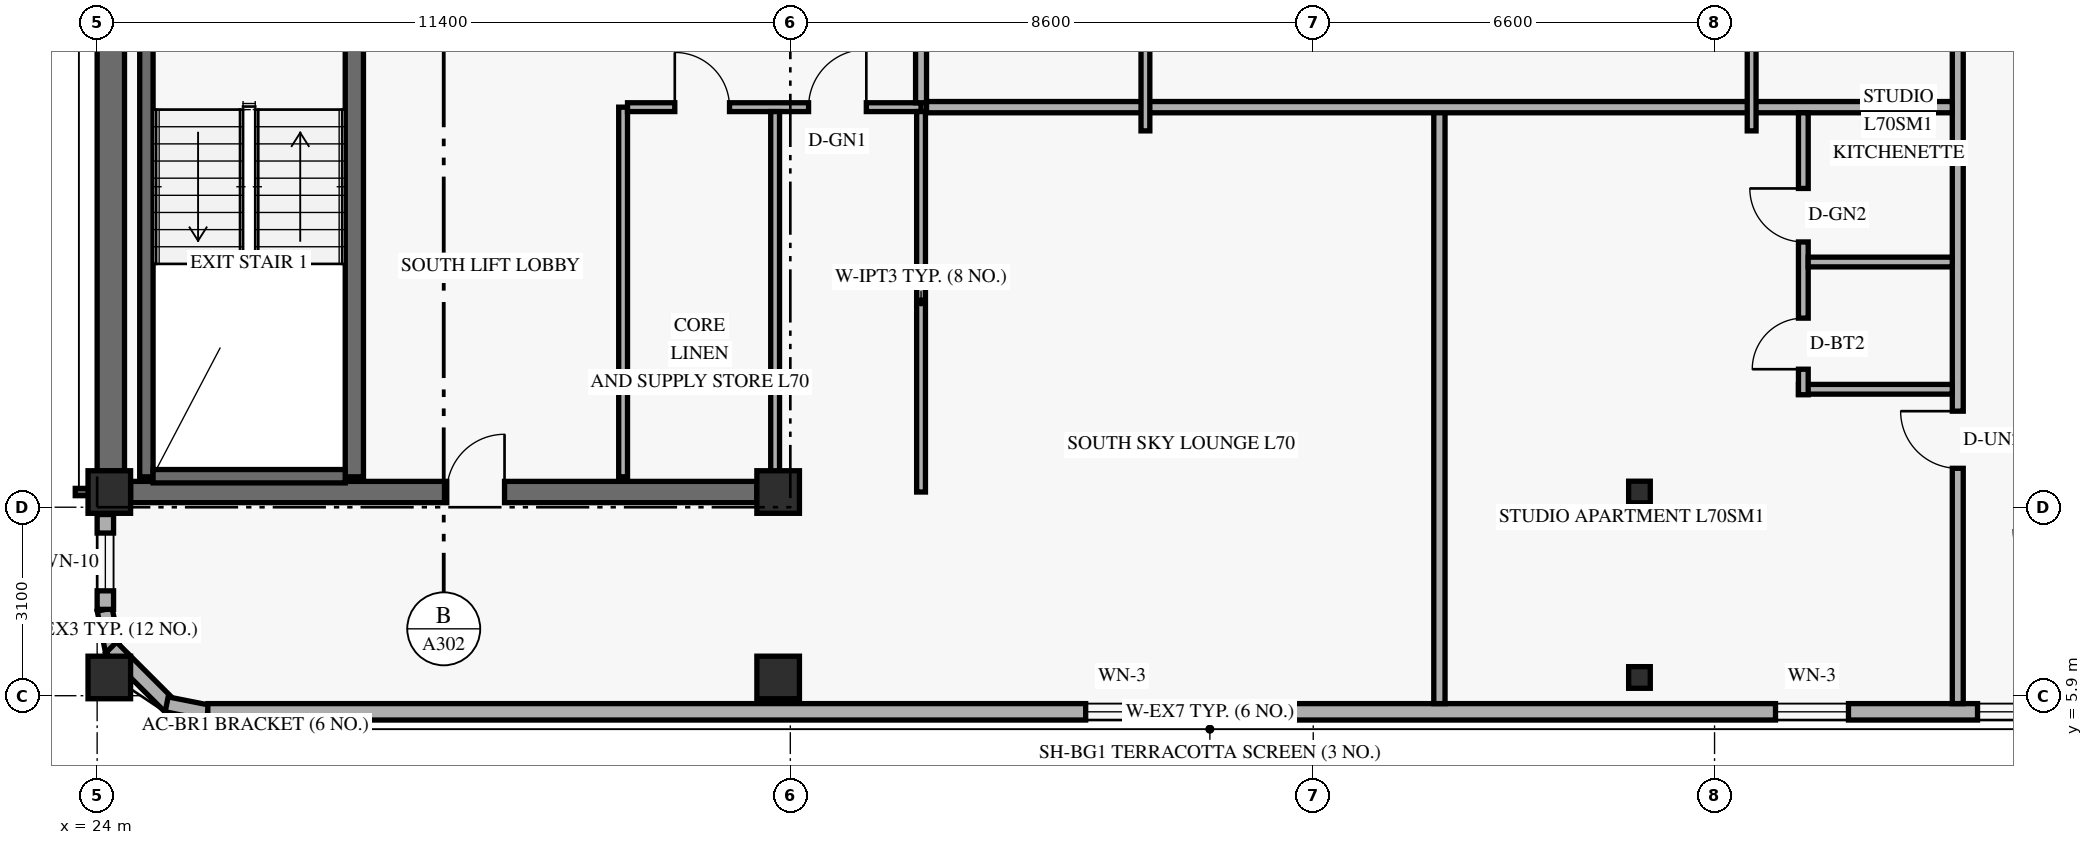
"""IFC4 building model, lengths in metres.
Left out: names, types, materials, properties, quantities, classifications, styles, units other than length and angle.
Written with IfcOpenShell. Run it as: python <this file> out.ifc"""

import sys

from ifc_helpers import new_model, si_unit, direction, frame, frame_2d, origin, origin_2d, place, context, subcontext, project, spatial, rectangle, hollow_rectangle, extrude, element, fill, save


model = new_model("IFC4")
c1 = context("Model", 3, precision=1e-05, world=origin(), true_north=direction((0.0, 1.0)))
c2 = subcontext(c1, "Body", "Model", "MODEL_VIEW")
j1 = project(units=[si_unit("LENGTHUNIT", "METRE"), si_unit("PLANEANGLEUNIT", "RADIAN")], contexts=[c1])
p1 = place(None, origin())
s1 = spatial("IfcSite", under=j1, at=p1, CompositionType="ELEMENT")
p2 = place(p1, origin())
s2 = spatial("IfcBuilding", under=s1, at=p2, CompositionType="ELEMENT")
p3 = place(p2, frame((0.0, 0.0, 267.6)))
s3 = spatial("IfcBuildingStorey", under=s2, at=p3, CompositionType="ELEMENT", Elevation=267.6)
p4 = place(p3, frame((24.225, 9.6, 0.0), z_axis=(0.0, 0.0, 1.0), x_axis=(0.0, 1.0, 0.0)))
e1 = element("IfcWall", 1, at=p4, inside=s3, PredefinedType="SHEAR", context=c2, shape_type="SweptSolid", body=[
    extrude(rectangle(XDim=7.6, YDim=0.45, at=frame_2d((3.8, 0.0))), origin(), (0.0, 0.0, 1.0), 2.821),
])
p5 = place(p3, frame((24.55, 9.25, 0.0), z_axis=(0.0, 0.0, 1.0), x_axis=(1.0, 0.0, 0.0)))
e2 = element("IfcWall", 2, at=p5, inside=s3, PredefinedType="SHEAR", context=c2, shape_type="SweptSolid", body=[
    extrude(rectangle(XDim=10.3, YDim=0.35, at=frame_2d((5.15, 0.0))), origin(), (0.0, 0.0, 1.0), 3.36),
])
p6 = place(p5, frame((5.2, 0.0, 0.0)))
e3 = element("IfcOpeningElement", 3, at=p6, cuts=e2, PredefinedType="OPENING", context=c2, shape_type="SweptSolid", body=[
    extrude(rectangle(XDim=0.95, YDim=2.15, at=frame_2d((0.475, 1.075))), frame((0.0, 0.185, 0.0), z_axis=(0.0, -1.0, 0.0), x_axis=(1.0, 0.0, 0.0)), (0.0, 0.0, 1.0), 0.37),
])
p7 = place(p3, frame((24.81, 9.5, 0.0), z_axis=(0.0, 0.0, 1.0), x_axis=(0.0, 1.0, 0.0)))
e4 = element("IfcWall", 4, at=p7, inside=s3, PredefinedType="SHEAR", context=c2, shape_type="SweptSolid", body=[
    extrude(rectangle(XDim=7.76, YDim=0.22, at=frame_2d((3.88, 0.0))), origin(), (0.0, 0.0, 1.0), 3.36),
])
p8 = place(p3, frame((28.23, 9.5, 0.0), z_axis=(0.0, 0.0, 1.0), x_axis=(0.0, 1.0, 0.0)))
e5 = element("IfcWall", 5, at=p8, inside=s3, PredefinedType="SHEAR", context=c2, shape_type="SweptSolid", body=[
    extrude(rectangle(XDim=7.76, YDim=0.3, at=frame_2d((3.88, 0.0))), origin(), (0.0, 0.0, 1.0), 3.36),
])
p9 = place(p3, frame((24.92, 9.51, 0.0), z_axis=(0.0, 0.0, 1.0), x_axis=(1.0, 0.0, 0.0)))
e6 = element("IfcWall", 6, at=p9, inside=s3, PredefinedType="SHEAR", context=c2, shape_type="SweptSolid", body=[
    extrude(rectangle(XDim=3.16, YDim=0.22, at=frame_2d((1.58, 0.0))), origin(), (0.0, 0.0, 1.0), 3.36),
])
for number, where, z_axis, x_axis in (
    (7, (24.2, 6.2, 0.0), (0.0, 0.0, 1.0), (1.0, 0.0, 0.0)),
    (8, (24.2, 9.25, 0.0), (0.0, 0.0, 1.0), (1.0, 0.0, 0.0)),
    (9, (35.2, 6.2, 0.0), (0.0, 0.0, 1.0), (1.0, 0.0, 0.0)),
    (10, (35.2, 9.25, 0.0), (0.0, 0.0, 1.0), (1.0, 0.0, 0.0)),
):
    element("IfcColumn", number, at=place(p3, frame(where, z_axis=z_axis, x_axis=x_axis)), inside=s3, PredefinedType="COLUMN", context=c2, shape_type="SweptSolid", body=[
        extrude(rectangle(XDim=0.7, YDim=0.7, at=origin_2d()), origin(), (0.0, 0.0, 1.0), 3.6),
    ])
for number, where, z_axis, x_axis in (
    (11, (49.302, 6.2, 0.0), (0.035, 0.0, 0.999), (0.0, 1.0, 0.0)),
    (12, (49.302, 9.25, 0.0), (0.035, 0.0, 0.999), (0.0, 1.0, 0.0)),
):
    element("IfcColumn", number, at=place(p3, frame(where, z_axis=z_axis, x_axis=x_axis)), inside=s3, PredefinedType="COLUMN", context=c2, shape_type="SweptSolid", body=[
        extrude(hollow_rectangle(XDim=0.356, YDim=0.356, WallThickness=0.016, at=origin_2d()), origin(), (0.0, 0.0, 1.0), 3.602),
    ])
p10 = place(p3, frame((24.124, 7.316, 0.0), z_axis=(0.0, 0.0, 1.0), x_axis=(0.194952956674, -0.980812594069, 0.0)))
e13 = element("IfcWall", 13, at=p10, inside=s3, PredefinedType="SOLIDWALL", context=c2, shape_type="SweptSolid", body=[
    extrude(rectangle(XDim=0.686, YDim=0.25, at=frame_2d((0.343, 0.0))), origin(), (0.0, 0.0, 1.0), 2.803),
])
p11 = place(p3, frame((24.231, 6.694, 0.0), z_axis=(0.0, 0.0, 1.0), x_axis=(0.707106781187, -0.707106781187, 0.0)))
e14 = element("IfcWall", 14, at=p11, inside=s3, PredefinedType="SOLIDWALL", context=c2, shape_type="SweptSolid", body=[
    extrude(rectangle(XDim=1.362, YDim=0.25, at=frame_2d((0.681, 0.0))), origin(), (0.0, 0.0, 1.0), 2.803),
])
p12 = place(p3, frame((25.143, 5.758, 0.0), z_axis=(0.0, 0.0, 1.0), x_axis=(0.980812594069, -0.194952956674, 0.0)))
e15 = element("IfcWall", 15, at=p12, inside=s3, PredefinedType="SOLIDWALL", context=c2, shape_type="SweptSolid", body=[
    extrude(rectangle(XDim=0.686, YDim=0.25, at=frame_2d((0.343, 0.0))), origin(), (0.0, 0.0, 1.0), 3.36),
])
p13 = place(p3, frame((25.82, 5.635, 0.0), z_axis=(0.0, 0.0, 1.0), x_axis=(1.0, 0.0, 0.0)))
e16 = element("IfcWall", 16, at=p13, inside=s3, PredefinedType="SOLIDWALL", context=c2, shape_type="SweptSolid", body=[
    extrude(rectangle(XDim=32.96, YDim=0.27, at=frame_2d((16.48, 0.0))), origin(), (0.0, 0.0, 1.0), 3.36),
])
p14 = place(p13, frame((14.438, 0.0, 0.85)))
e17 = element("IfcOpeningElement", 17, at=p14, cuts=e16, PredefinedType="OPENING", context=c2, shape_type="SweptSolid", body=[
    extrude(rectangle(XDim=1.2, YDim=1.5, at=frame_2d((0.6, 0.75))), frame((0.0, 0.145, 0.0), z_axis=(0.0, -1.0, 0.0), x_axis=(1.0, 0.0, 0.0)), (0.0, 0.0, 1.0), 0.29),
])
p15 = place(p13, frame((25.782, 0.0, 0.85)))
e18 = element("IfcOpeningElement", 18, at=p15, cuts=e16, PredefinedType="OPENING", context=c2, shape_type="SweptSolid", body=[
    extrude(rectangle(XDim=1.2, YDim=1.5, at=frame_2d((0.6, 0.75))), frame((0.0, 0.145, 0.0), z_axis=(0.0, -1.0, 0.0), x_axis=(1.0, 0.0, 0.0)), (0.0, 0.0, 1.0), 0.29),
])
p16 = place(p13, frame((29.105, 0.0, 0.85)))
e19 = element("IfcOpeningElement", 19, at=p16, cuts=e16, PredefinedType="OPENING", context=c2, shape_type="SweptSolid", body=[
    extrude(rectangle(XDim=1.2, YDim=1.5, at=frame_2d((0.6, 0.75))), frame((0.0, 0.145, 0.0), z_axis=(0.0, -1.0, 0.0), x_axis=(1.0, 0.0, 0.0)), (0.0, 0.0, 1.0), 0.29),
])
p17 = place(p3, frame((24.135, 7.32, 0.0), z_axis=(0.0, 0.0, 1.0), x_axis=(0.0, 1.0, 0.0)))
e20 = element("IfcWall", 20, at=p17, inside=s3, PredefinedType="SOLIDWALL", context=c2, shape_type="SweptSolid", body=[
    extrude(rectangle(XDim=1.56, YDim=0.27, at=frame_2d((0.78, 0.0))), origin(), (0.0, 0.0, 1.0), 2.803),
])
p18 = place(p17, frame((0.305, 0.0, 0.85)))
e21 = element("IfcOpeningElement", 21, at=p18, cuts=e20, PredefinedType="OPENING", context=c2, shape_type="SweptSolid", body=[
    extrude(rectangle(XDim=0.95, YDim=1.5, at=frame_2d((0.475, 0.75))), frame((0.0, 0.145, 0.0), z_axis=(0.0, -1.0, 0.0), x_axis=(1.0, 0.0, 0.0)), (0.0, 0.0, 1.0), 0.29),
])
p19 = place(p3, frame((32.65, 9.5, 0.0), z_axis=(0.0, 0.0, 1.0), x_axis=(0.0, 1.0, 0.0)))
e22 = element("IfcWall", 22, at=p19, inside=s3, PredefinedType="PARTITIONING", context=c2, shape_type="SweptSolid", body=[
    extrude(rectangle(XDim=6.08, YDim=0.145, at=frame_2d((3.04, 0.0))), origin(), (0.0, 0.0, 1.0), 3.36),
])
p20 = place(p3, frame((32.722, 15.58, 0.0), z_axis=(0.0, 0.0, 1.0), x_axis=(1.0, 0.0, 0.0)))
e23 = element("IfcWall", 23, at=p20, inside=s3, PredefinedType="PARTITIONING", context=c2, shape_type="SweptSolid", body=[
    extrude(rectangle(XDim=4.828, YDim=0.145, at=frame_2d((2.414, 0.0))), origin(), (0.0, 0.0, 1.0), 2.803),
])
p21 = place(p20, frame((0.778, 0.0, 0.0)))
e24 = element("IfcOpeningElement", 24, at=p21, cuts=e23, PredefinedType="OPENING", context=c2, shape_type="SweptSolid", body=[
    extrude(rectangle(XDim=0.9, YDim=2.1, at=frame_2d((0.45, 1.05))), frame((0.0, 0.083, 0.0), z_axis=(0.0, -1.0, 0.0), x_axis=(1.0, 0.0, 0.0)), (0.0, 0.0, 1.0), 0.165),
])
p22 = place(p20, frame((2.978, 0.0, 0.0)))
e25 = element("IfcOpeningElement", 25, at=p22, cuts=e23, PredefinedType="OPENING", context=c2, shape_type="SweptSolid", body=[
    extrude(rectangle(XDim=0.95, YDim=2.15, at=frame_2d((0.475, 1.075))), frame((0.0, 0.083, 0.0), z_axis=(0.0, -1.0, 0.0), x_axis=(1.0, 0.0, 0.0)), (0.0, 0.0, 1.0), 0.165),
])
p23 = place(p3, frame((37.55, 9.25, 0.0), z_axis=(0.0, 0.0, 1.0), x_axis=(0.0, 1.0, 0.0)))
e26 = element("IfcWall", 26, at=p23, inside=s3, PredefinedType="PARTITIONING", context=c2, shape_type="SweptSolid", body=[
    extrude(rectangle(XDim=6.258, YDim=0.145, at=frame_2d((3.129, 0.0))), origin(), (0.0, 0.0, 1.0), 2.803),
])
p24 = place(p3, frame((35.15, 9.5, 0.0), z_axis=(0.0, 0.0, 1.0), x_axis=(0.0, 1.0, 0.0)))
e27 = element("IfcWall", 27, at=p24, inside=s3, PredefinedType="PARTITIONING", context=c2, shape_type="SweptSolid", body=[
    extrude(rectangle(XDim=6.008, YDim=0.145, at=frame_2d((3.004, 0.0))), origin(), (0.0, 0.0, 1.0), 2.803),
])
p25 = place(p3, frame((37.55, 15.653, 0.0), z_axis=(0.0, 0.0, 1.0), x_axis=(0.0, 1.0, 0.0)))
e28 = element("IfcWall", 28, at=p25, inside=s3, PredefinedType="STANDARD", context=c2, shape_type="SweptSolid", body=[
    extrude(rectangle(XDim=9.347, YDim=0.18, at=frame_2d((4.674, 0.0))), origin(), (0.0, 0.0, 1.0), 2.803),
])
p26 = place(p3, frame((54.6, 5.77, 0.0), z_axis=(0.0, 0.0, 1.0), x_axis=(0.0, 1.0, 0.0)))
e29 = element("IfcWall", 29, at=p26, inside=s3, PredefinedType="STANDARD", context=c2, shape_type="SweptSolid", body=[
    extrude(rectangle(XDim=19.23, YDim=0.18, at=frame_2d((9.615, 0.0))), origin(), (0.0, 0.0, 1.0), 2.803),
])
p27 = place(p26, frame((3.87, 0.0, 0.0)))
e30 = element("IfcOpeningElement", 30, at=p27, cuts=e29, PredefinedType="OPENING", context=c2, shape_type="SweptSolid", body=[
    extrude(rectangle(XDim=0.94, YDim=2.15, at=frame_2d((0.47, 1.075))), frame((0.0, 0.1, 0.0), z_axis=(0.0, -1.0, 0.0), x_axis=(1.0, 0.0, 0.0)), (0.0, 0.0, 1.0), 0.2),
])
p28 = place(p3, frame((46.075, 5.77, 0.0), z_axis=(0.0, 0.0, 1.0), x_axis=(0.0, 1.0, 0.0)))
e31 = element("IfcWall", 31, at=p28, inside=s3, PredefinedType="PARTITIONING", context=c2, shape_type="SweptSolid", body=[
    extrude(rectangle(XDim=9.81, YDim=0.185, at=frame_2d((4.905, 0.0))), origin(), (0.0, 0.0, 1.0), 2.803),
])
p29 = place(p3, frame((37.64, 15.58, 0.0), z_axis=(0.0, 0.0, 1.0), x_axis=(1.0, 0.0, 0.0)))
e32 = element("IfcWall", 32, at=p29, inside=s3, PredefinedType="PARTITIONING", context=c2, shape_type="SweptSolid", body=[
    extrude(rectangle(XDim=16.87, YDim=0.185, at=frame_2d((8.435, 0.0))), origin(), (0.0, 0.0, 1.0), 2.803),
])
p30 = place(p3, frame((51.98, 10.94, 0.0), z_axis=(0.0, 0.0, 1.0), x_axis=(1.0, 0.0, 0.0)))
e33 = element("IfcWall", 33, at=p30, inside=s3, PredefinedType="PLUMBINGWALL", context=c2, shape_type="SweptSolid", body=[
    extrude(rectangle(XDim=2.53, YDim=0.16, at=frame_2d((1.265, 0.0))), origin(), (0.0, 0.0, 1.0), 3.36),
])
p31 = place(p3, frame((52.06, 10.85, 0.0), z_axis=(0.0, 0.0, 1.0), x_axis=(0.0, 1.0, 0.0)))
e34 = element("IfcWall", 34, at=p31, inside=s3, PredefinedType="PLUMBINGWALL", context=c2, shape_type="SweptSolid", body=[
    extrude(rectangle(XDim=4.637, YDim=0.16, at=frame_2d((2.319, 0.0))), origin(), (0.0, 0.0, 1.0), 3.039),
])
p32 = place(p31, frame((0.42, 0.0, 0.0)))
e35 = element("IfcOpeningElement", 35, at=p32, cuts=e34, PredefinedType="OPENING", context=c2, shape_type="SweptSolid", body=[
    extrude(rectangle(XDim=0.84, YDim=2.12, at=frame_2d((0.42, 1.06))), frame((0.0, 0.09, 0.0), z_axis=(0.0, -1.0, 0.0), x_axis=(1.0, 0.0, 0.0)), (0.0, 0.0, 1.0), 0.18),
])
p33 = place(p31, frame((2.513, 0.0, 0.0)))
e36 = element("IfcOpeningElement", 36, at=p33, cuts=e34, PredefinedType="OPENING", context=c2, shape_type="SweptSolid", body=[
    extrude(rectangle(XDim=0.88, YDim=2.12, at=frame_2d((0.44, 1.06))), frame((0.0, 0.09, 0.0), z_axis=(0.0, -1.0, 0.0), x_axis=(1.0, 0.0, 0.0)), (0.0, 0.0, 1.0), 0.18),
])
p34 = place(p3, frame((52.14, 13.033, 0.0), z_axis=(0.0, 0.0, 1.0), x_axis=(1.0, 0.0, 0.0)))
e37 = element("IfcWall", 37, at=p34, inside=s3, PredefinedType="PLUMBINGWALL", context=c2, shape_type="SweptSolid", body=[
    extrude(rectangle(XDim=2.37, YDim=0.16, at=frame_2d((1.185, 0.0))), origin(), (0.0, 0.0, 1.0), 3.36),
])
p35 = place(p3, frame((51.21, 15.19, 0.0), z_axis=(0.0, 0.0, 1.0), x_axis=(0.0, 1.0, 0.0)))
e38 = element("IfcWall", 38, at=p35, inside=s3, PredefinedType="PARTITIONING", context=c2, shape_type="SweptSolid", body=[
    extrude(rectangle(XDim=9.72, YDim=0.145, at=frame_2d((4.86, 0.0))), origin(), (0.0, 0.0, 1.0), 2.803),
])
p36 = place(p35, frame((2.445, 0.0, 0.0)))
e39 = element("IfcOpeningElement", 39, at=p36, cuts=e38, PredefinedType="OPENING", context=c2, shape_type="SweptSolid", body=[
    extrude(rectangle(XDim=0.88, YDim=2.14, at=frame_2d((0.44, 1.07))), frame((0.0, 0.083, 0.0), z_axis=(0.0, -1.0, 0.0), x_axis=(1.0, 0.0, 0.0)), (0.0, 0.0, 1.0), 0.165),
])
p37 = place(p35, frame((5.84, 0.0, 0.0)))
e40 = element("IfcOpeningElement", 40, at=p37, cuts=e38, PredefinedType="OPENING", context=c2, shape_type="SweptSolid", body=[
    extrude(rectangle(XDim=0.88, YDim=2.12, at=frame_2d((0.44, 1.06))), frame((0.0, 0.083, 0.0), z_axis=(0.0, -1.0, 0.0), x_axis=(1.0, 0.0, 0.0)), (0.0, 0.0, 1.0), 0.165),
])
p38 = place(p3, frame((41.24, 15.19, 0.0), z_axis=(0.0, 0.0, 1.0), x_axis=(0.0, 1.0, 0.0)))
e41 = element("IfcWall", 41, at=p38, inside=s3, PredefinedType="PARTITIONING", context=c2, shape_type="SweptSolid", body=[
    extrude(rectangle(XDim=9.72, YDim=0.145, at=frame_2d((4.86, 0.0))), origin(), (0.0, 0.0, 1.0), 2.803),
])
p39 = place(p38, frame((4.17, 0.0, 0.0)))
e42 = element("IfcOpeningElement", 42, at=p39, cuts=e41, PredefinedType="OPENING", context=c2, shape_type="SweptSolid", body=[
    extrude(rectangle(XDim=0.95, YDim=2.15, at=frame_2d((0.475, 1.075))), frame((0.0, 0.083, 0.0), z_axis=(0.0, -1.0, 0.0), x_axis=(1.0, 0.0, 0.0)), (0.0, 0.0, 1.0), 0.165),
])
p40 = place(p14, origin())
e43 = element("IfcWindow", 43, at=p40, inside=s3, PartitioningType="SINGLE_PANEL", PredefinedType="WINDOW", context=c2, shape_type="SweptSolid", body=[
    extrude(rectangle(XDim=1.2, YDim=1.5, at=frame_2d((0.6, 0.75))), frame((0.0, 0.03, 0.0), z_axis=(0.0, -1.0, 0.0), x_axis=(1.0, 0.0, 0.0)), (0.0, 0.0, 1.0), 0.06),
])
fill(e17, e43)
p41 = place(p15, origin())
e44 = element("IfcWindow", 44, at=p41, inside=s3, PartitioningType="SINGLE_PANEL", PredefinedType="WINDOW", context=c2, shape_type="SweptSolid", body=[
    extrude(rectangle(XDim=1.2, YDim=1.5, at=frame_2d((0.6, 0.75))), frame((0.0, 0.03, 0.0), z_axis=(0.0, -1.0, 0.0), x_axis=(1.0, 0.0, 0.0)), (0.0, 0.0, 1.0), 0.06),
])
fill(e18, e44)
p42 = place(p16, origin())
e45 = element("IfcWindow", 45, at=p42, inside=s3, PartitioningType="SINGLE_PANEL", PredefinedType="WINDOW", context=c2, shape_type="SweptSolid", body=[
    extrude(rectangle(XDim=1.2, YDim=1.5, at=frame_2d((0.6, 0.75))), frame((0.0, 0.03, 0.0), z_axis=(0.0, -1.0, 0.0), x_axis=(1.0, 0.0, 0.0)), (0.0, 0.0, 1.0), 0.06),
])
fill(e19, e45)
p43 = place(p18, origin())
e46 = element("IfcWindow", 46, at=p43, inside=s3, PartitioningType="SINGLE_PANEL", PredefinedType="WINDOW", context=c2, shape_type="SweptSolid", body=[
    extrude(rectangle(XDim=0.95, YDim=1.5, at=frame_2d((0.475, 0.75))), frame((0.0, 0.03, 0.0), z_axis=(0.0, -1.0, 0.0), x_axis=(1.0, 0.0, 0.0)), (0.0, 0.0, 1.0), 0.06),
])
fill(e21, e46)
p44 = place(p21, origin())
e47 = element("IfcDoor", 47, at=p44, inside=s3, OperationType="SINGLE_SWING_LEFT", PredefinedType="DOOR", context=c2, shape_type="SweptSolid", body=[
    extrude(rectangle(XDim=0.9, YDim=2.1, at=frame_2d((0.45, 1.05))), frame((0.0, 0.025, 0.0), z_axis=(0.0, -1.0, 0.0), x_axis=(1.0, 0.0, 0.0)), (0.0, 0.0, 1.0), 0.05),
])
fill(e24, e47)
p45 = place(p22, origin())
e48 = element("IfcDoor", 48, at=p45, inside=s3, OperationType="SINGLE_SWING_RIGHT", PredefinedType="DOOR", context=c2, shape_type="SweptSolid", body=[
    extrude(rectangle(XDim=0.95, YDim=2.15, at=frame_2d((0.475, 1.075))), frame((0.0, 0.025, 0.0), z_axis=(0.0, -1.0, 0.0), x_axis=(1.0, 0.0, 0.0)), (0.0, 0.0, 1.0), 0.05),
])
fill(e25, e48)
p46 = place(p6, frame((0.95, 0.0, 0.0), z_axis=(0.0, 0.0, 1.0), x_axis=(-1.0, 0.0, 0.0)))
e49 = element("IfcDoor", 49, at=p46, inside=s3, OperationType="SINGLE_SWING_LEFT", PredefinedType="DOOR", context=c2, shape_type="SweptSolid", body=[
    extrude(rectangle(XDim=0.95, YDim=2.15, at=frame_2d((0.475, 1.075))), frame((0.0, 0.025, 0.0), z_axis=(0.0, -1.0, 0.0), x_axis=(1.0, 0.0, 0.0)), (0.0, 0.0, 1.0), 0.05),
])
fill(e3, e49)
p47 = place(p27, origin())
e50 = element("IfcDoor", 50, at=p47, inside=s3, OperationType="SINGLE_SWING_RIGHT", PredefinedType="DOOR", context=c2, shape_type="SweptSolid", body=[
    extrude(rectangle(XDim=0.94, YDim=2.15, at=frame_2d((0.47, 1.075))), frame((0.0, 0.025, 0.0), z_axis=(0.0, -1.0, 0.0), x_axis=(1.0, 0.0, 0.0)), (0.0, 0.0, 1.0), 0.05),
])
fill(e30, e50)
p48 = place(p32, origin())
e51 = element("IfcDoor", 51, at=p48, inside=s3, OperationType="SINGLE_SWING_LEFT", PredefinedType="DOOR", context=c2, shape_type="SweptSolid", body=[
    extrude(rectangle(XDim=0.84, YDim=2.12, at=frame_2d((0.42, 1.06))), frame((0.0, 0.025, 0.0), z_axis=(0.0, -1.0, 0.0), x_axis=(1.0, 0.0, 0.0)), (0.0, 0.0, 1.0), 0.05),
])
fill(e35, e51)
p49 = place(p33, origin())
e52 = element("IfcDoor", 52, at=p49, inside=s3, OperationType="SINGLE_SWING_RIGHT", PredefinedType="DOOR", context=c2, shape_type="SweptSolid", body=[
    extrude(rectangle(XDim=0.88, YDim=2.12, at=frame_2d((0.44, 1.06))), frame((0.0, 0.025, 0.0), z_axis=(0.0, -1.0, 0.0), x_axis=(1.0, 0.0, 0.0)), (0.0, 0.0, 1.0), 0.05),
])
fill(e36, e52)
save(model, sys.argv[1])
